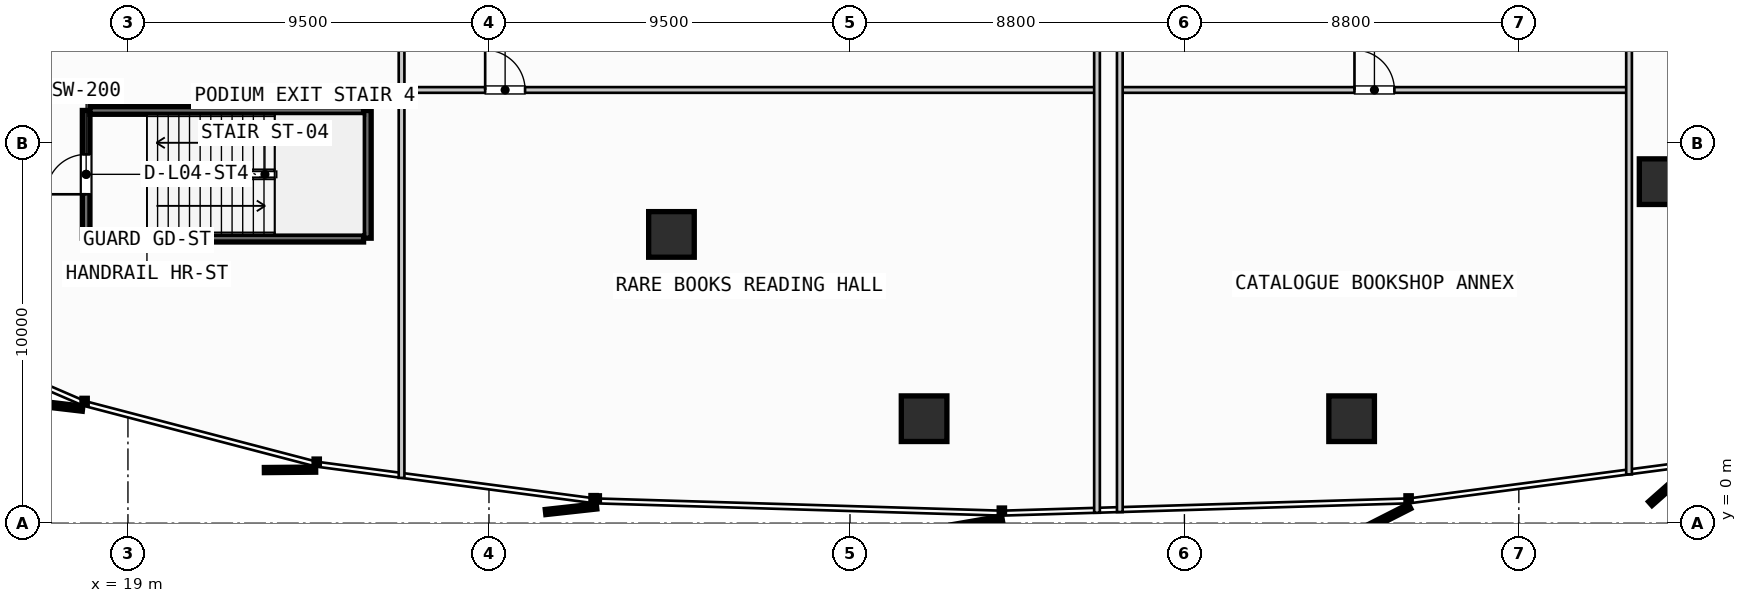
"""IFC4 building model, lengths in metres.
Left out: names, types, materials, properties, quantities, classifications, styles, units other than length and angle.
Written with IfcOpenShell. Run it as: python <this file> out.ifc"""

import sys

from ifc_helpers import new_model, si_unit, direction, frame, frame_2d, origin, origin_2d, place, context, subcontext, project, spatial, rectangle, hollow_rectangle, extrude, source, transform, mapped, element, fill, save


model = new_model("IFC4")
c1 = context("Model", 3, precision=1e-05, world=origin(), true_north=direction((0.0, 1.0)))
c2 = subcontext(c1, "Body", "Model", "MODEL_VIEW")
j1 = project(units=[si_unit("LENGTHUNIT", "METRE"), si_unit("PLANEANGLEUNIT", "RADIAN")], contexts=[c1])
p1 = place(None, origin())
s1 = spatial("IfcSite", under=j1, at=p1, CompositionType="ELEMENT")
p2 = place(p1, origin())
s2 = spatial("IfcBuilding", under=s1, at=p2, CompositionType="ELEMENT")
p3 = place(p2, frame((0.0, 0.0, 19.6)))
s3 = spatial("IfcBuildingStorey", under=s2, at=p3, CompositionType="ELEMENT", Elevation=19.6)
m1 = source(origin(), c2, "Body", "SweptSolid", [
    extrude(hollow_rectangle(XDim=1.2, YDim=1.2, WallThickness=0.045, InnerFilletRadius=0.02, OuterFilletRadius=0.065, at=origin_2d()), origin(), (0.0, 0.0, 1.0), 4.08),
])
for number, where, z_axis, x_axis in (
    (1, (33.302, 7.599, 0.0), (0.0, 0.0, 1.0), (1.0, 0.0, 0.0)),
    (2, (39.95, 2.75, 0.0), (0.0, 0.0, 1.0), (1.0, 0.0, 0.0)),
    (3, (51.2, 2.75, 0.0), (0.0, 0.0, 1.0), (1.0, 0.0, 0.0)),
    (4, (59.37, 8.987, 0.0), (0.0, 0.0, 1.0), (1.0, 0.0, 0.0)),
):
    element("IfcColumn", number, at=place(p3, frame(where, z_axis=z_axis, x_axis=x_axis)), inside=s3, PredefinedType="COLUMN", context=c2, shape_type="MappedRepresentation", body=[
        mapped(m1, transform((0.0, 0.0, 0.0), scale=1.0)),
    ])
p4 = place(p3, frame((17.9, 7.5, 0.0), z_axis=(0.0, 0.0, 1.0), x_axis=(0.0, 1.0, 0.0)))
e5 = element("IfcWall", 5, at=p4, inside=s3, PredefinedType="SHEAR", context=c2, shape_type="SweptSolid", body=[
    extrude(rectangle(XDim=3.36, YDim=0.2, at=frame_2d((1.68, 0.0))), origin(), (0.0, 0.0, 1.0), 4.08),
])
p5 = place(p4, frame((1.155, 0.0, 0.0)))
e6 = element("IfcOpeningElement", 6, at=p5, cuts=e5, PredefinedType="OPENING", context=c2, shape_type="SweptSolid", body=[
    extrude(rectangle(XDim=1.05, YDim=2.15, at=frame_2d((0.525, 1.075))), frame((0.0, 0.11, 0.0), z_axis=(0.0, -1.0, 0.0), x_axis=(1.0, 0.0, 0.0)), (0.0, 0.0, 1.0), 0.22),
])
p6 = place(p3, frame((25.3, 10.86, 0.0), z_axis=(0.0, 0.0, 1.0), x_axis=(0.0, -1.0, 0.0)))
e7 = element("IfcWall", 7, at=p6, inside=s3, PredefinedType="SHEAR", context=c2, shape_type="SweptSolid", body=[
    extrude(rectangle(XDim=3.36, YDim=0.2, at=frame_2d((1.68, 0.0))), origin(), (0.0, 0.0, 1.0), 4.08),
])
for number, where, z_axis, x_axis in (
    (8, (25.2, 7.5, 0.0), (0.0, 0.0, 1.0), (-1.0, 0.0, 0.0)),
    (9, (18.0, 10.86, 0.0), (0.0, 0.0, 1.0), (1.0, 0.0, 0.0)),
):
    element("IfcWall", number, at=place(p3, frame(where, z_axis=z_axis, x_axis=x_axis)), inside=s3, PredefinedType="SHEAR", context=c2, shape_type="SweptSolid", body=[
        extrude(rectangle(XDim=7.2, YDim=0.2, at=frame_2d((3.6, 0.0))), origin(), (0.0, 0.0, 1.0), 4.08),
    ])
p7 = place(p3, frame((26.2, 11.4, 0.0), z_axis=(0.0, 0.0, 1.0), x_axis=(1.0, 0.0, 0.0)))
e10 = element("IfcWall", 10, at=p7, inside=s3, PredefinedType="PARTITIONING", context=c2, shape_type="SweptSolid", body=[
    extrude(rectangle(XDim=18.3, YDim=0.15, at=frame_2d((9.15, 0.0))), origin(), (0.0, 0.0, 1.0), 3.293),
])
p8 = place(p7, frame((2.2, 0.0, 0.0)))
e11 = element("IfcOpeningElement", 11, at=p8, cuts=e10, PredefinedType="OPENING", context=c2, shape_type="SweptSolid", body=[
    extrude(rectangle(XDim=1.05, YDim=2.15, at=frame_2d((0.525, 1.075))), frame((0.0, 0.085, 0.0), z_axis=(0.0, -1.0, 0.0), x_axis=(1.0, 0.0, 0.0)), (0.0, 0.0, 1.0), 0.17),
])
p9 = place(p3, frame((26.2, 1.193, 0.0), z_axis=(0.0, 0.0, 1.0), x_axis=(0.0, 1.0, 0.0)))
e12 = element("IfcWall", 12, at=p9, inside=s3, PredefinedType="PARTITIONING", context=c2, shape_type="SweptSolid", body=[
    extrude(rectangle(XDim=12.207, YDim=0.15, at=frame_2d((6.104, 0.0))), origin(), (0.0, 0.0, 1.0), 3.293),
])
p10 = place(p3, frame((44.5, 0.275, 0.0), z_axis=(0.0, 0.0, 1.0), x_axis=(0.0, 1.0, 0.0)))
e13 = element("IfcWall", 13, at=p10, inside=s3, PredefinedType="PARTITIONING", context=c2, shape_type="SweptSolid", body=[
    extrude(rectangle(XDim=13.125, YDim=0.15, at=frame_2d((6.562, 0.0))), origin(), (0.0, 0.0, 1.0), 3.293),
])
p11 = place(p3, frame((45.1, 11.4, 0.0), z_axis=(0.0, 0.0, 1.0), x_axis=(1.0, 0.0, 0.0)))
e14 = element("IfcWall", 14, at=p11, inside=s3, PredefinedType="PARTITIONING", context=c2, shape_type="SweptSolid", body=[
    extrude(rectangle(XDim=13.4, YDim=0.15, at=frame_2d((6.7, 0.0))), origin(), (0.0, 0.0, 1.0), 3.293),
])
p12 = place(p11, frame((6.175, 0.0, 0.0)))
e15 = element("IfcOpeningElement", 15, at=p12, cuts=e14, PredefinedType="OPENING", context=c2, shape_type="SweptSolid", body=[
    extrude(rectangle(XDim=1.05, YDim=2.15, at=frame_2d((0.525, 1.075))), frame((0.0, 0.085, 0.0), z_axis=(0.0, -1.0, 0.0), x_axis=(1.0, 0.0, 0.0)), (0.0, 0.0, 1.0), 0.17),
])
p13 = place(p3, frame((45.1, 0.293, 0.0), z_axis=(0.0, 0.0, 1.0), x_axis=(0.0, 1.0, 0.0)))
e16 = element("IfcWall", 16, at=p13, inside=s3, PredefinedType="PARTITIONING", context=c2, shape_type="SweptSolid", body=[
    extrude(rectangle(XDim=13.106, YDim=0.15, at=frame_2d((6.553, 0.0))), origin(), (0.0, 0.0, 1.0), 3.293),
])
p14 = place(p3, frame((58.5, 1.285, 0.0), z_axis=(0.0, 0.0, 1.0), x_axis=(0.0, 1.0, 0.0)))
e17 = element("IfcWall", 17, at=p14, inside=s3, PredefinedType="PARTITIONING", context=c2, shape_type="SweptSolid", body=[
    extrude(rectangle(XDim=12.115, YDim=0.15, at=frame_2d((6.057, 0.0))), origin(), (0.0, 0.0, 1.0), 3.293),
])
m2 = source(origin(), c2, "Body", "SweptSolid", [
    extrude(rectangle(XDim=1.05, YDim=2.15, at=frame_2d((0.525, 1.075))), frame((0.0, 0.025, 0.0), z_axis=(0.0, -1.0, 0.0), x_axis=(1.0, 0.0, 0.0)), (0.0, 0.0, 1.0), 0.05),
])
p15 = place(p5, origin())
e18 = element("IfcDoor", 18, at=p15, inside=s3, OperationType="SINGLE_SWING_LEFT", PredefinedType="DOOR", context=c2, shape_type="MappedRepresentation", body=[
    mapped(m2, transform((0.0, 0.0, 0.0), scale=1.0)),
])
fill(e6, e18)
p16 = place(p8, origin())
e19 = element("IfcDoor", 19, at=p16, inside=s3, OperationType="SINGLE_SWING_LEFT", PredefinedType="DOOR", context=c2, shape_type="MappedRepresentation", body=[
    mapped(m2, transform((0.0, 0.0, 0.0), scale=1.0)),
])
fill(e11, e19)
p17 = place(p12, origin())
e20 = element("IfcDoor", 20, at=p17, inside=s3, OperationType="SINGLE_SWING_LEFT", PredefinedType="DOOR", context=c2, shape_type="MappedRepresentation", body=[
    mapped(m2, transform((0.0, 0.0, 0.0), scale=1.0)),
])
fill(e15, e20)
save(model, sys.argv[1])
